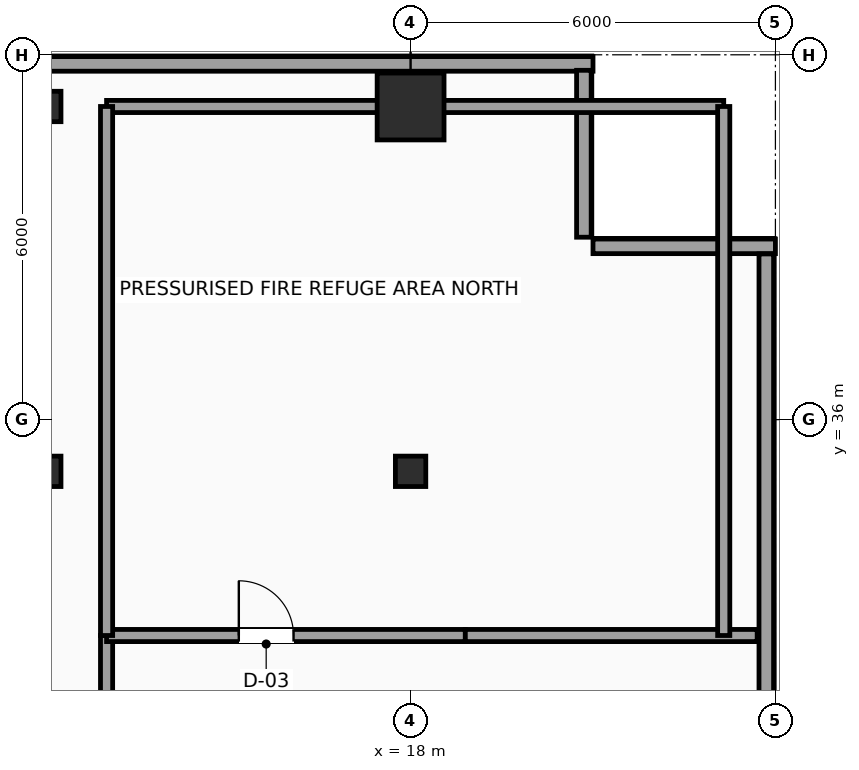
"""IFC4 building model, lengths in metres.
Left out: names, types, materials, properties, quantities, classifications, styles, units other than length and angle.
Written with IfcOpenShell. Run it as: python <this file> out.ifc"""

import sys

from ifc_helpers import new_model, si_unit, direction, frame, frame_2d, origin, origin_2d, place, context, subcontext, project, spatial, rectangle, hollow_rectangle, extrude, element, fill, save


model = new_model("IFC4")
c1 = context("Model", 3, precision=1e-05, world=origin(), true_north=direction((0.0, 1.0)))
c2 = subcontext(c1, "Body", "Model", "MODEL_VIEW")
j1 = project(units=[si_unit("LENGTHUNIT", "METRE"), si_unit("PLANEANGLEUNIT", "RADIAN")], contexts=[c1])
p1 = place(None, origin())
s1 = spatial("IfcSite", under=j1, at=p1, CompositionType="ELEMENT")
p2 = place(p1, origin())
s2 = spatial("IfcBuilding", under=s1, at=p2, CompositionType="ELEMENT")
p3 = place(p2, frame((0.0, 0.0, 164.4)))
s3 = spatial("IfcBuildingStorey", under=s2, at=p3, CompositionType="ELEMENT", Elevation=164.4)
p4 = place(p3, frame((12.0, 35.15, 0.0), z_axis=(0.0, 0.0, 1.0), x_axis=(1.0, 0.0, 0.0)))
e1 = element("IfcColumn", 1, at=p4, inside=s3, PredefinedType="COLUMN", context=c2, shape_type="SweptSolid", body=[
    extrude(hollow_rectangle(XDim=0.5, YDim=0.5, WallThickness=0.025, InnerFilletRadius=0.025, OuterFilletRadius=0.04, at=origin_2d()), origin(), (0.0, 0.0, 1.0), 4.8),
])
p5 = place(p3, frame((12.0, 41.15, 0.0), z_axis=(0.0, 0.0, 1.0), x_axis=(1.0, 0.0, 0.0)))
e2 = element("IfcColumn", 2, at=p5, inside=s3, PredefinedType="COLUMN", context=c2, shape_type="SweptSolid", body=[
    extrude(hollow_rectangle(XDim=0.5, YDim=0.5, WallThickness=0.025, InnerFilletRadius=0.025, OuterFilletRadius=0.04, at=origin_2d()), origin(), (0.0, 0.0, 1.0), 4.56),
])
p6 = place(p3, frame((18.0, 35.15, 0.0), z_axis=(0.0, 0.0, 1.0), x_axis=(1.0, 0.0, 0.0)))
e3 = element("IfcColumn", 3, at=p6, inside=s3, PredefinedType="COLUMN", context=c2, shape_type="SweptSolid", body=[
    extrude(hollow_rectangle(XDim=0.5, YDim=0.5, WallThickness=0.025, InnerFilletRadius=0.025, OuterFilletRadius=0.04, at=origin_2d()), origin(), (0.0, 0.0, 1.0), 4.8),
])
p7 = place(p3, frame((18.0, 41.15, 0.0), z_axis=(0.0, 0.0, 1.0), x_axis=(1.0, 0.0, 0.0)))
e4 = element("IfcColumn", 4, at=p7, inside=s3, PredefinedType="COLUMN", context=c2, shape_type="SweptSolid", body=[
    extrude(rectangle(XDim=1.1, YDim=1.1, at=origin_2d()), origin(), (0.0, 0.0, 1.0), 4.56),
])
p8 = place(p3, frame((3.0, 41.85, 0.0), z_axis=(0.0, 0.0, 1.0), x_axis=(1.0, 0.0, 0.0)))
e5 = element("IfcWall", 5, at=p8, inside=s3, PredefinedType="SOLIDWALL", context=c2, shape_type="SweptSolid", body=[
    extrude(rectangle(XDim=18.0, YDim=0.24, at=frame_2d((9.0, 0.0))), origin(), (0.0, 0.0, 1.0), 4.59),
])
p9 = place(p3, frame((20.85, 41.745, 0.0), z_axis=(0.0, 0.0, 1.0), x_axis=(0.0, -1.0, 0.0)))
e6 = element("IfcWall", 6, at=p9, inside=s3, PredefinedType="SOLIDWALL", context=c2, shape_type="SweptSolid", body=[
    extrude(rectangle(XDim=2.745, YDim=0.24, at=frame_2d((1.373, 0.0))), origin(), (0.0, 0.0, 1.0), 4.59),
])
p10 = place(p3, frame((21.0, 38.85, 0.0), z_axis=(0.0, 0.0, 1.0), x_axis=(1.0, 0.0, 0.0)))
e7 = element("IfcWall", 7, at=p10, inside=s3, PredefinedType="SOLIDWALL", context=c2, shape_type="SweptSolid", body=[
    extrude(rectangle(XDim=3.0, YDim=0.24, at=frame_2d((1.5, 0.0))), origin(), (0.0, 0.0, 1.0), 4.59),
])
p11 = place(p3, frame((23.85, 38.725, 0.0), z_axis=(0.0, 0.0, 1.0), x_axis=(0.0, -1.0, 0.0)))
e8 = element("IfcWall", 8, at=p11, inside=s3, PredefinedType="SOLIDWALL", context=c2, shape_type="SweptSolid", body=[
    extrude(rectangle(XDim=14.725, YDim=0.24, at=frame_2d((7.363, 0.0))), origin(), (0.0, 0.0, 1.0), 4.59),
])
p12 = place(p3, frame((13.0, 30.1, 0.0), z_axis=(0.0, 0.0, 1.0), x_axis=(0.0, 1.0, 0.0)))
e9 = element("IfcWall", 9, at=p12, inside=s3, PredefinedType="SOLIDWALL", context=c2, shape_type="SweptSolid", body=[
    extrude(rectangle(XDim=2.35, YDim=0.2, at=frame_2d((1.175, 0.0))), origin(), (0.0, 0.0, 1.0), 4.59),
])
p13 = place(p3, frame((13.0, 32.45, 0.0), z_axis=(0.0, 0.0, 1.0), x_axis=(1.0, 0.0, 0.0)))
e10 = element("IfcWall", 10, at=p13, inside=s3, PredefinedType="SOLIDWALL", context=c2, shape_type="SweptSolid", body=[
    extrude(rectangle(XDim=5.9, YDim=0.2, at=frame_2d((2.95, 0.0))), origin(), (0.0, 0.0, 1.0), 4.59),
])
p14 = place(p13, frame((2.175, 0.0, 0.0)))
e11 = element("IfcOpeningElement", 11, at=p14, cuts=e10, PredefinedType="OPENING", context=c2, shape_type="SweptSolid", body=[
    extrude(rectangle(XDim=0.9, YDim=2.15, at=frame_2d((0.45, 1.075))), frame((0.0, 0.11, 0.0), z_axis=(0.0, -1.0, 0.0), x_axis=(1.0, 0.0, 0.0)), (0.0, 0.0, 1.0), 0.22),
])
p15 = place(p3, frame((18.9, 32.45, 0.0), z_axis=(0.0, 0.0, 1.0), x_axis=(1.0, 0.0, 0.0)))
e12 = element("IfcWall", 12, at=p15, inside=s3, PredefinedType="SOLIDWALL", context=c2, shape_type="SweptSolid", body=[
    extrude(rectangle(XDim=4.8, YDim=0.2, at=frame_2d((2.4, 0.0))), origin(), (0.0, 0.0, 1.0), 4.59),
])
p16 = place(p3, frame((13.0, 41.15, 0.0), z_axis=(0.0, 0.0, 1.0), x_axis=(1.0, 0.0, 0.0)))
e13 = element("IfcWall", 13, at=p16, inside=s3, PredefinedType="SOLIDWALL", context=c2, shape_type="SweptSolid", body=[
    extrude(rectangle(XDim=10.15, YDim=0.2, at=frame_2d((5.075, 0.0))), origin(), (0.0, 0.0, 1.0), 4.052),
])
for number, where, z_axis, x_axis in (
    (14, (13.0, 32.45, 0.0), (0.0, 0.0, 1.0), (0.0, 1.0, 0.0)),
    (15, (23.15, 32.45, 0.0), (0.0, 0.0, 1.0), (0.0, 1.0, 0.0)),
):
    element("IfcWall", number, at=place(p3, frame(where, z_axis=z_axis, x_axis=x_axis)), inside=s3, PredefinedType="SOLIDWALL", context=c2, shape_type="SweptSolid", body=[
        extrude(rectangle(XDim=8.7, YDim=0.2, at=frame_2d((4.35, 0.0))), origin(), (0.0, 0.0, 1.0), 4.59),
    ])
p17 = place(p14, origin())
e16 = element("IfcDoor", 16, at=p17, inside=s3, OperationType="SINGLE_SWING_LEFT", PredefinedType="DOOR", context=c2, shape_type="SweptSolid", body=[
    extrude(rectangle(XDim=0.9, YDim=2.15, at=frame_2d((0.45, 1.075))), frame((0.0, 0.025, 0.0), z_axis=(0.0, -1.0, 0.0), x_axis=(1.0, 0.0, 0.0)), (0.0, 0.0, 1.0), 0.05),
])
fill(e11, e16)
save(model, sys.argv[1])
